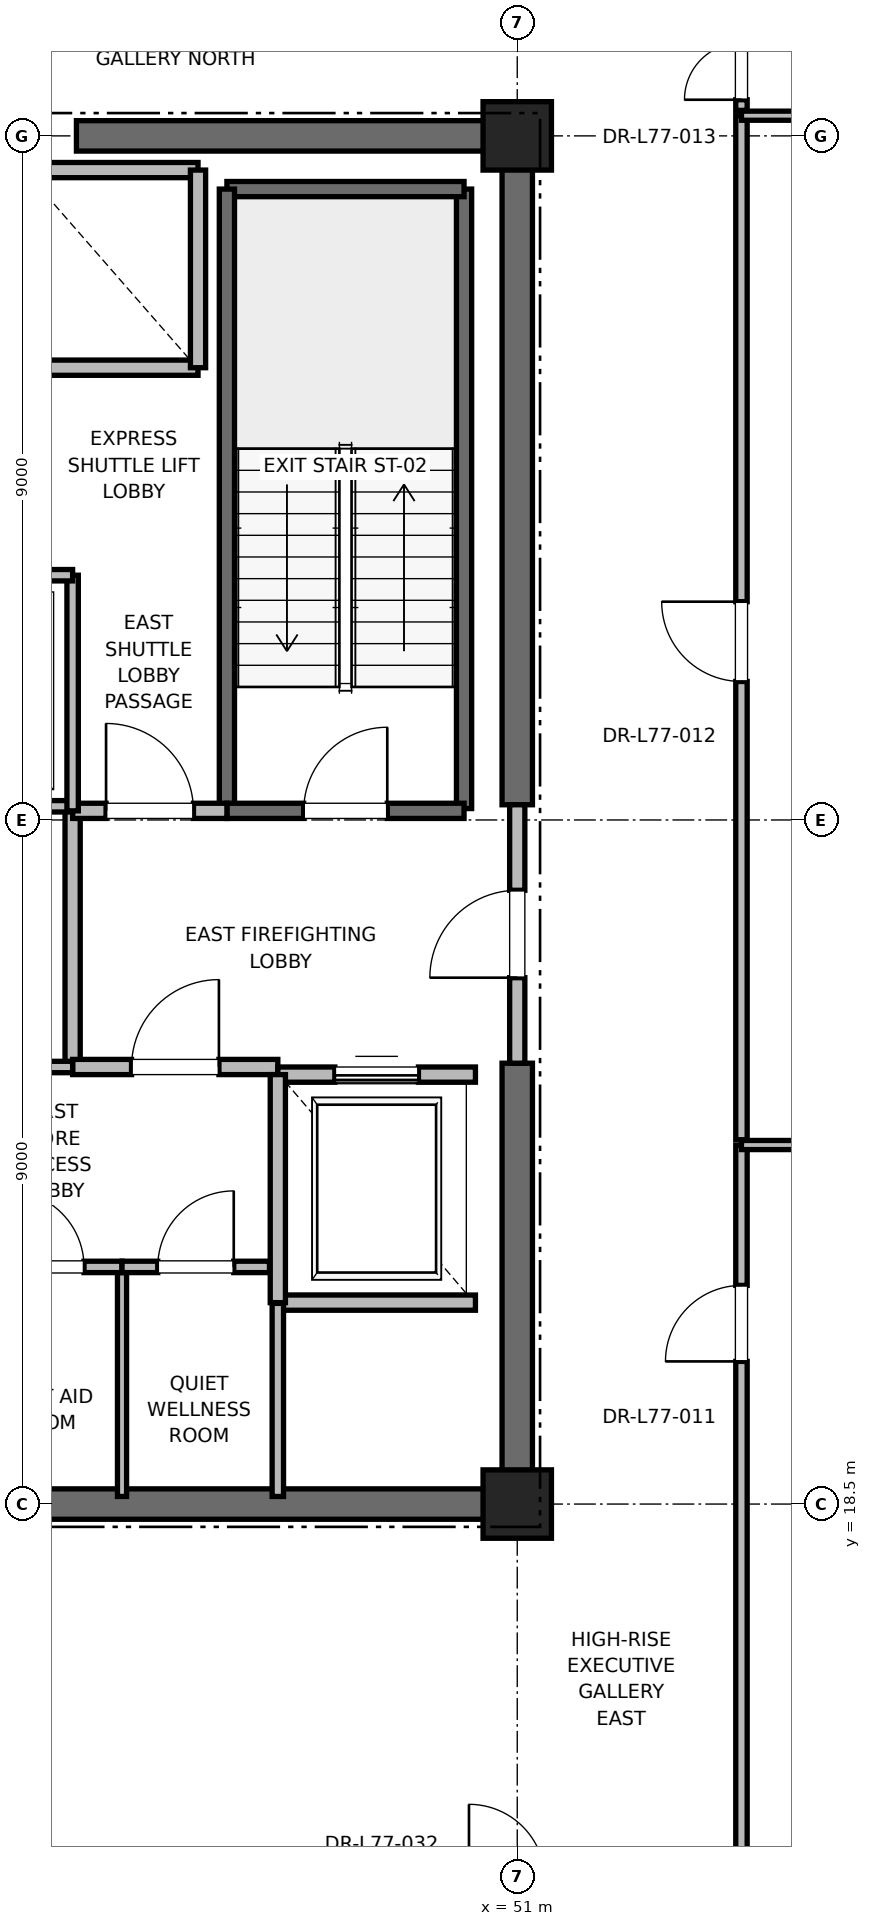
"""IFC4 building model, lengths in metres.
Left out: names, types, materials, properties, quantities, classifications, styles, units other than length and angle.
Written with IfcOpenShell. Run it as: python <this file> out.ifc"""

import sys

from ifc_helpers import new_model, si_unit, direction, frame, frame_2d, origin, origin_2d, place, context, subcontext, project, spatial, rectangle, extrude, element, fill, save


model = new_model("IFC4")
c1 = context("Model", 3, precision=1e-05, world=origin(), true_north=direction((0.0, 1.0)))
c2 = subcontext(c1, "Body", "Model", "MODEL_VIEW")
j1 = project(units=[si_unit("LENGTHUNIT", "METRE"), si_unit("PLANEANGLEUNIT", "RADIAN")], contexts=[c1])
p1 = place(None, origin())
s1 = spatial("IfcSite", under=j1, at=p1, CompositionType="ELEMENT")
p2 = place(p1, origin())
s2 = spatial("IfcBuilding", under=s1, at=p2, CompositionType="ELEMENT")
p3 = place(p2, frame((0.0, 0.0, 330.8)))
s3 = spatial("IfcBuildingStorey", under=s2, at=p3, CompositionType="ELEMENT", Elevation=330.8)
for number, where, z_axis, x_axis in (
    (1, (51.0, 18.5, 0.0), (0.0, 0.0, 1.0), (1.0, 0.0, 0.0)),
    (2, (51.0, 36.5, 0.0), (0.0, 0.0, 1.0), (1.0, 0.0, 0.0)),
):
    element("IfcColumn", number, at=place(p3, frame(where, z_axis=z_axis, x_axis=x_axis)), inside=s3, PredefinedType="PILASTER", context=c2, shape_type="SweptSolid", body=[
        extrude(rectangle(XDim=0.9, YDim=0.9, at=origin_2d()), origin(), (0.0, 0.0, 1.0), 4.0),
    ])
p4 = place(p3, frame((41.8, 18.5, 0.0), z_axis=(0.0, 0.0, 1.0), x_axis=(1.0, 0.0, 0.0)))
e3 = element("IfcWall", 3, at=p4, inside=s3, PredefinedType="SHEAR", context=c2, shape_type="SweptSolid", body=[
    extrude(rectangle(XDim=9.2, YDim=0.4, at=frame_2d((4.6, 0.0))), origin(), (0.0, 0.0, 1.0), 3.785),
])
for number, where, z_axis, x_axis in (
    (4, (45.2, 36.5, 0.0), (0.0, 0.0, 1.0), (1.0, 0.0, 0.0)),
    (5, (51.0, 18.5, 0.0), (0.0, 0.0, 1.0), (0.0, 1.0, 0.0)),
):
    element("IfcWall", number, at=place(p3, frame(where, z_axis=z_axis, x_axis=x_axis)), inside=s3, PredefinedType="SHEAR", context=c2, shape_type="SweptSolid", body=[
        extrude(rectangle(XDim=5.8, YDim=0.4, at=frame_2d((2.9, 0.0))), origin(), (0.0, 0.0, 1.0), 3.785),
    ])
p5 = place(p3, frame((51.0, 27.7, 0.0), z_axis=(0.0, 0.0, 1.0), x_axis=(0.0, 1.0, 0.0)))
e6 = element("IfcWall", 6, at=p5, inside=s3, PredefinedType="SHEAR", context=c2, shape_type="SweptSolid", body=[
    extrude(rectangle(XDim=8.8, YDim=0.4, at=frame_2d((4.4, 0.0))), origin(), (0.0, 0.0, 1.0), 3.785),
])
p6 = place(p3, frame((50.3, 27.65, 0.0), z_axis=(0.0, 0.0, 1.0), x_axis=(0.0, 1.0, 0.0)))
e7 = element("IfcWall", 7, at=p6, inside=s3, PredefinedType="SOLIDWALL", context=c2, shape_type="SweptSolid", body=[
    extrude(rectangle(XDim=8.15, YDim=0.2, at=frame_2d((4.075, 0.0))), origin(), (0.0, 0.0, 1.0), 3.785),
])
p7 = place(p3, frame((47.18, 35.8, 0.0), z_axis=(0.0, 0.0, 1.0), x_axis=(1.0, 0.0, 0.0)))
e8 = element("IfcWall", 8, at=p7, inside=s3, PredefinedType="SOLIDWALL", context=c2, shape_type="SweptSolid", body=[
    extrude(rectangle(XDim=3.12, YDim=0.2, at=frame_2d((1.56, 0.0))), origin(), (0.0, 0.0, 1.0), 3.785),
])
p8 = place(p3, frame((47.18, 27.62, 0.0), z_axis=(0.0, 0.0, 1.0), x_axis=(0.0, 1.0, 0.0)))
e9 = element("IfcWall", 9, at=p8, inside=s3, PredefinedType="SOLIDWALL", context=c2, shape_type="SweptSolid", body=[
    extrude(rectangle(XDim=8.18, YDim=0.2, at=frame_2d((4.09, 0.0))), origin(), (0.0, 0.0, 1.0), 3.785),
])
p9 = place(p3, frame((47.18, 27.62, 0.0), z_axis=(0.0, 0.0, 1.0), x_axis=(1.0, 0.0, 0.0)))
e10 = element("IfcWall", 10, at=p9, inside=s3, PredefinedType="SOLIDWALL", context=c2, shape_type="SweptSolid", body=[
    extrude(rectangle(XDim=3.12, YDim=0.2, at=frame_2d((1.56, 0.0))), origin(), (0.0, 0.0, 1.0), 3.785),
])
p10 = place(p9, frame((1.01, 0.0, 0.0)))
e11 = element("IfcOpeningElement", 11, at=p10, cuts=e10, PredefinedType="OPENING", context=c2, shape_type="SweptSolid", body=[
    extrude(rectangle(XDim=1.1, YDim=2.15, at=frame_2d((0.55, 1.075))), frame((0.0, 0.1, 0.0), z_axis=(0.0, -1.0, 0.0), x_axis=(1.0, 0.0, 0.0)), (0.0, 0.0, 1.0), 0.2),
])
p11 = place(p3, frame((45.15, 24.25, 0.0), z_axis=(0.0, 0.0, 1.0), x_axis=(0.0, 1.0, 0.0)))
e12 = element("IfcWall", 12, at=p11, inside=s3, PredefinedType="PARTITIONING", context=c2, shape_type="SweptSolid", body=[
    extrude(rectangle(XDim=3.37, YDim=0.2, at=frame_2d((1.685, 0.0))), origin(), (0.0, 0.0, 1.0), 3.785),
])
p12 = place(p3, frame((45.15, 24.25, 0.0), z_axis=(0.0, 0.0, 1.0), x_axis=(1.0, 0.0, 0.0)))
e13 = element("IfcWall", 13, at=p12, inside=s3, PredefinedType="PARTITIONING", context=c2, shape_type="SweptSolid", body=[
    extrude(rectangle(XDim=2.7, YDim=0.2, at=frame_2d((1.35, 0.0))), origin(), (0.0, 0.0, 1.0), 3.785),
])
p13 = place(p12, frame((0.775, 0.0, 0.0)))
e14 = element("IfcOpeningElement", 14, at=p13, cuts=e13, PredefinedType="OPENING", context=c2, shape_type="SweptSolid", body=[
    extrude(rectangle(XDim=1.15, YDim=2.2, at=frame_2d((0.575, 1.1))), frame((0.0, 0.1, 0.0), z_axis=(0.0, -1.0, 0.0), x_axis=(1.0, 0.0, 0.0)), (0.0, 0.0, 1.0), 0.2),
])
p14 = place(p3, frame((45.15, 27.62, 0.0), z_axis=(0.0, 0.0, 1.0), x_axis=(1.0, 0.0, 0.0)))
e15 = element("IfcWall", 15, at=p14, inside=s3, PredefinedType="PARTITIONING", context=c2, shape_type="SweptSolid", body=[
    extrude(rectangle(XDim=2.03, YDim=0.2, at=frame_2d((1.015, 0.0))), origin(), (0.0, 0.0, 1.0), 3.785),
])
p15 = place(p14, frame((0.44, 0.0, 0.0)))
e16 = element("IfcOpeningElement", 16, at=p15, cuts=e15, PredefinedType="OPENING", context=c2, shape_type="SweptSolid", body=[
    extrude(rectangle(XDim=1.15, YDim=2.2, at=frame_2d((0.575, 1.1))), frame((0.0, 0.1, 0.0), z_axis=(0.0, -1.0, 0.0), x_axis=(1.0, 0.0, 0.0)), (0.0, 0.0, 1.0), 0.2),
])
p16 = place(p3, frame((51.0, 24.3, 0.0), z_axis=(0.0, 0.0, 1.0), x_axis=(0.0, 1.0, 0.0)))
e17 = element("IfcWall", 17, at=p16, inside=s3, PredefinedType="PARTITIONING", context=c2, shape_type="SweptSolid", body=[
    extrude(rectangle(XDim=3.4, YDim=0.2, at=frame_2d((1.7, 0.0))), origin(), (0.0, 0.0, 1.0), 2.865),
])
p17 = place(p16, frame((1.125, 0.0, 0.0)))
e18 = element("IfcOpeningElement", 18, at=p17, cuts=e17, PredefinedType="OPENING", context=c2, shape_type="SweptSolid", body=[
    extrude(rectangle(XDim=1.15, YDim=2.2, at=frame_2d((0.575, 1.1))), frame((0.0, 0.1, 0.0), z_axis=(0.0, -1.0, 0.0), x_axis=(1.0, 0.0, 0.0)), (0.0, 0.0, 1.0), 0.2),
])
p18 = place(p3, frame((47.85, 21.15, 0.0), z_axis=(0.0, 0.0, 1.0), x_axis=(1.0, 0.0, 0.0)))
e19 = element("IfcWall", 19, at=p18, inside=s3, PredefinedType="SOLIDWALL", context=c2, shape_type="SweptSolid", body=[
    extrude(rectangle(XDim=2.6, YDim=0.2, at=frame_2d((1.3, 0.0))), origin(), (0.0, 0.0, 1.0), 3.785),
])
p19 = place(p3, frame((50.45, 24.15, 0.0), z_axis=(0.0, 0.0, 1.0), x_axis=(-1.0, 0.0, 0.0)))
e20 = element("IfcWall", 20, at=p19, inside=s3, PredefinedType="SOLIDWALL", context=c2, shape_type="SweptSolid", body=[
    extrude(rectangle(XDim=2.6, YDim=0.2, at=frame_2d((1.3, 0.0))), origin(), (0.0, 0.0, 1.0), 2.865),
])
p20 = place(p19, frame((0.75, 0.0, 0.0)))
e21 = element("IfcOpeningElement", 21, at=p20, cuts=e20, PredefinedType="OPENING", context=c2, shape_type="SweptSolid", body=[
    extrude(rectangle(XDim=1.1, YDim=2.2, at=frame_2d((0.55, 1.1))), frame((0.0, 0.1, 0.0), z_axis=(0.0, -1.0, 0.0), x_axis=(1.0, 0.0, 0.0)), (0.0, 0.0, 1.0), 0.2),
])
p21 = place(p3, frame((47.85, 24.15, 0.0), z_axis=(0.0, 0.0, 1.0), x_axis=(0.0, -1.0, 0.0)))
e22 = element("IfcWall", 22, at=p21, inside=s3, PredefinedType="SOLIDWALL", context=c2, shape_type="SweptSolid", body=[
    extrude(rectangle(XDim=3.0, YDim=0.2, at=frame_2d((1.5, 0.0))), origin(), (0.0, 0.0, 1.0), 3.785),
])
p22 = place(p3, frame((44.5, 33.45, 0.0), z_axis=(0.0, 0.0, 1.0), x_axis=(1.0, 0.0, 0.0)))
e23 = element("IfcWall", 23, at=p22, inside=s3, PredefinedType="SOLIDWALL", context=c2, shape_type="SweptSolid", body=[
    extrude(rectangle(XDim=2.3, YDim=0.2, at=frame_2d((1.15, 0.0))), origin(), (0.0, 0.0, 1.0), 3.785),
])
p23 = place(p3, frame((46.8, 36.05, 0.0), z_axis=(0.0, 0.0, 1.0), x_axis=(-1.0, 0.0, 0.0)))
e24 = element("IfcWall", 24, at=p23, inside=s3, PredefinedType="SOLIDWALL", context=c2, shape_type="SweptSolid", body=[
    extrude(rectangle(XDim=2.3, YDim=0.2, at=frame_2d((1.15, 0.0))), origin(), (0.0, 0.0, 1.0), 2.865),
])
p24 = place(p3, frame((46.8, 33.45, 0.0), z_axis=(0.0, 0.0, 1.0), x_axis=(0.0, 1.0, 0.0)))
e25 = element("IfcWall", 25, at=p24, inside=s3, PredefinedType="SOLIDWALL", context=c2, shape_type="SweptSolid", body=[
    extrude(rectangle(XDim=2.6, YDim=0.2, at=frame_2d((1.3, 0.0))), origin(), (0.0, 0.0, 1.0), 3.785),
])
p25 = place(p3, frame((41.56, 27.68, 0.0), z_axis=(0.0, 0.0, 1.0), x_axis=(1.0, 0.0, 0.0)))
e26 = element("IfcWall", 26, at=p25, inside=s3, PredefinedType="PARTITIONING", context=c2, shape_type="SweptSolid", body=[
    extrude(rectangle(XDim=3.59, YDim=0.15, at=frame_2d((1.795, 0.0))), origin(), (0.0, 0.0, 1.0), 2.85),
])
p26 = place(p3, frame((47.85, 18.6, 0.0), z_axis=(0.0, 0.0, 1.0), x_axis=(0.0, 1.0, 0.0)))
e27 = element("IfcWall", 27, at=p26, inside=s3, PredefinedType="PARTITIONING", context=c2, shape_type="SweptSolid", body=[
    extrude(rectangle(XDim=2.54, YDim=0.15, at=frame_2d((1.27, 0.0))), origin(), (0.0, 0.0, 1.0), 2.85),
])
p27 = place(p3, frame((45.8, 18.6, 0.0), z_axis=(0.0, 0.0, 1.0), x_axis=(0.0, 1.0, 0.0)))
e28 = element("IfcWall", 28, at=p27, inside=s3, PredefinedType="PARTITIONING", context=c2, shape_type="SweptSolid", body=[
    extrude(rectangle(XDim=3.02, YDim=0.12, at=frame_2d((1.51, 0.0))), origin(), (0.0, 0.0, 1.0), 2.85),
])
p28 = place(p3, frame((43.8, 21.62, 0.0), z_axis=(0.0, 0.0, 1.0), x_axis=(1.0, 0.0, 0.0)))
e29 = element("IfcWall", 29, at=p28, inside=s3, PredefinedType="PARTITIONING", context=c2, shape_type="SweptSolid", body=[
    extrude(rectangle(XDim=2.0, YDim=0.15, at=frame_2d((1.0, 0.0))), origin(), (0.0, 0.0, 1.0), 2.85),
])
p29 = place(p28, frame((0.5, 0.0, 0.0)))
e30 = element("IfcOpeningElement", 30, at=p29, cuts=e29, PredefinedType="OPENING", context=c2, shape_type="SweptSolid", body=[
    extrude(rectangle(XDim=1.0, YDim=2.15, at=frame_2d((0.5, 1.075))), frame((0.0, 0.075, 0.0), z_axis=(0.0, -1.0, 0.0), x_axis=(1.0, 0.0, 0.0)), (0.0, 0.0, 1.0), 0.15),
])
p30 = place(p3, frame((45.8, 21.62, 0.0), z_axis=(0.0, 0.0, 1.0), x_axis=(1.0, 0.0, 0.0)))
e31 = element("IfcWall", 31, at=p30, inside=s3, PredefinedType="PARTITIONING", context=c2, shape_type="SweptSolid", body=[
    extrude(rectangle(XDim=1.94, YDim=0.15, at=frame_2d((0.97, 0.0))), origin(), (0.0, 0.0, 1.0), 2.85),
])
p31 = place(p30, frame((0.47, 0.0, 0.0)))
e32 = element("IfcOpeningElement", 32, at=p31, cuts=e31, PredefinedType="OPENING", context=c2, shape_type="SweptSolid", body=[
    extrude(rectangle(XDim=1.0, YDim=2.15, at=frame_2d((0.5, 1.075))), frame((0.0, 0.075, 0.0), z_axis=(0.0, -1.0, 0.0), x_axis=(1.0, 0.0, 0.0)), (0.0, 0.0, 1.0), 0.15),
])
p32 = place(p3, frame((41.76, 24.25, 0.0), z_axis=(0.0, 0.0, 1.0), x_axis=(1.0, 0.0, 0.0)))
e33 = element("IfcWall", 33, at=p32, inside=s3, PredefinedType="PARTITIONING", context=c2, shape_type="SweptSolid", body=[
    extrude(rectangle(XDim=3.39, YDim=0.15, at=frame_2d((1.695, 0.0))), origin(), (0.0, 0.0, 1.0), 2.85),
])
p33 = place(p32, frame((1.255, 0.0, 0.0)))
e34 = element("IfcOpeningElement", 34, at=p33, cuts=e33, PredefinedType="OPENING", context=c2, shape_type="SweptSolid", body=[
    extrude(rectangle(XDim=0.88, YDim=2.1, at=frame_2d((0.44, 1.05))), frame((0.0, 0.075, 0.0), z_axis=(0.0, -1.0, 0.0), x_axis=(1.0, 0.0, 0.0)), (0.0, 0.0, 1.0), 0.15),
])
p34 = place(p3, frame((45.15, 27.62, 0.0), z_axis=(0.0, 0.0, 1.0), x_axis=(0.0, 1.0, 0.0)))
e35 = element("IfcWall", 35, at=p34, inside=s3, PredefinedType="PARTITIONING", context=c2, shape_type="SweptSolid", body=[
    extrude(rectangle(XDim=3.1, YDim=0.15, at=frame_2d((1.55, 0.0))), origin(), (0.0, 0.0, 1.0), 2.85),
])
p35 = place(p3, frame((43.6, 30.72, 0.0), z_axis=(0.0, 0.0, 1.0), x_axis=(1.0, 0.0, 0.0)))
e36 = element("IfcWall", 36, at=p35, inside=s3, PredefinedType="PARTITIONING", context=c2, shape_type="SweptSolid", body=[
    extrude(rectangle(XDim=1.55, YDim=0.15, at=frame_2d((0.775, 0.0))), origin(), (0.0, 0.0, 1.0), 2.85),
])
p36 = place(p35, frame((0.335, 0.0, 0.0)))
e37 = element("IfcOpeningElement", 37, at=p36, cuts=e36, PredefinedType="OPENING", context=c2, shape_type="SweptSolid", body=[
    extrude(rectangle(XDim=0.88, YDim=2.1, at=frame_2d((0.44, 1.05))), frame((0.0, 0.075, 0.0), z_axis=(0.0, -1.0, 0.0), x_axis=(1.0, 0.0, 0.0)), (0.0, 0.0, 1.0), 0.15),
])
p37 = place(p3, frame((53.95, 9.682, 0.0), z_axis=(0.0, 0.0, 1.0), x_axis=(0.0, 1.0, 0.0)))
e38 = element("IfcWall", 38, at=p37, inside=s3, PredefinedType="PARTITIONING", context=c2, shape_type="SweptSolid", body=[
    extrude(rectangle(XDim=13.542, YDim=0.15, at=frame_2d((6.771, 0.0))), origin(), (0.0, 0.0, 1.0), 2.85),
])
p38 = place(p37, frame((10.695, 0.0, 0.0)))
e39 = element("IfcOpeningElement", 39, at=p38, cuts=e38, PredefinedType="OPENING", context=c2, shape_type="SweptSolid", body=[
    extrude(rectangle(XDim=1.0, YDim=2.15, at=frame_2d((0.5, 1.075))), frame((0.0, 0.075, 0.0), z_axis=(0.0, -1.0, 0.0), x_axis=(1.0, 0.0, 0.0)), (0.0, 0.0, 1.0), 0.15),
])
p39 = place(p3, frame((53.95, 23.224, 0.0), z_axis=(0.0, 0.0, 1.0), x_axis=(1.0, 0.0, 0.0)))
e40 = element("IfcWall", 40, at=p39, inside=s3, PredefinedType="PARTITIONING", context=c2, shape_type="SweptSolid", body=[
    extrude(rectangle(XDim=10.586, YDim=0.12, at=frame_2d((5.293, 0.0))), origin(), (0.0, 0.0, 1.0), 2.85),
])
p40 = place(p3, frame((53.95, 23.294, 0.0), z_axis=(0.0, 0.0, 1.0), x_axis=(0.0, 1.0, 0.0)))
e41 = element("IfcWall", 41, at=p40, inside=s3, PredefinedType="PARTITIONING", context=c2, shape_type="SweptSolid", body=[
    extrude(rectangle(XDim=13.472, YDim=0.15, at=frame_2d((6.736, 0.0))), origin(), (0.0, 0.0, 1.0), 2.85),
])
p41 = place(p40, frame((6.028, 0.0, 0.0)))
e42 = element("IfcOpeningElement", 42, at=p41, cuts=e41, PredefinedType="OPENING", context=c2, shape_type="SweptSolid", body=[
    extrude(rectangle(XDim=1.05, YDim=2.2, at=frame_2d((0.525, 1.1))), frame((0.0, 0.075, 0.0), z_axis=(0.0, -1.0, 0.0), x_axis=(1.0, 0.0, 0.0)), (0.0, 0.0, 1.0), 0.15),
])
p42 = place(p3, frame((53.95, 36.765, 0.0), z_axis=(0.0, 0.0, 1.0), x_axis=(1.0, 0.0, 0.0)))
e43 = element("IfcWall", 43, at=p42, inside=s3, PredefinedType="PARTITIONING", context=c2, shape_type="SweptSolid", body=[
    extrude(rectangle(XDim=10.586, YDim=0.12, at=frame_2d((5.293, 0.0))), origin(), (0.0, 0.0, 1.0), 2.85),
])
p43 = place(p3, frame((53.95, 36.835, 0.0), z_axis=(0.0, 0.0, 1.0), x_axis=(0.0, 1.0, 0.0)))
e44 = element("IfcWall", 44, at=p43, inside=s3, PredefinedType="PARTITIONING", context=c2, shape_type="SweptSolid", body=[
    extrude(rectangle(XDim=8.483, YDim=0.15, at=frame_2d((4.241, 0.0))), origin(), (0.0, 0.0, 1.0), 2.85),
])
p44 = place(p43, frame((0.14, 0.0, 0.0)))
e45 = element("IfcOpeningElement", 45, at=p44, cuts=e44, PredefinedType="OPENING", context=c2, shape_type="SweptSolid", body=[
    extrude(rectangle(XDim=1.5, YDim=2.25, at=frame_2d((0.75, 1.125))), frame((0.0, 0.075, 0.0), z_axis=(0.0, -1.0, 0.0), x_axis=(1.0, 0.0, 0.0)), (0.0, 0.0, 1.0), 0.15),
])
p45 = place(p10, origin())
e46 = element("IfcDoor", 46, at=p45, inside=s3, OperationType="SINGLE_SWING_RIGHT", PredefinedType="DOOR", context=c2, shape_type="SweptSolid", body=[
    extrude(rectangle(XDim=1.1, YDim=2.15, at=frame_2d((0.55, 1.075))), frame((0.0, 0.025, 0.0), z_axis=(0.0, -1.0, 0.0), x_axis=(1.0, 0.0, 0.0)), (0.0, 0.0, 1.0), 0.05),
])
fill(e11, e46)
p46 = place(p13, origin())
e47 = element("IfcDoor", 47, at=p46, inside=s3, OperationType="SINGLE_SWING_RIGHT", PredefinedType="DOOR", context=c2, shape_type="SweptSolid", body=[
    extrude(rectangle(XDim=1.15, YDim=2.2, at=frame_2d((0.575, 1.1))), frame((0.0, 0.025, 0.0), z_axis=(0.0, -1.0, 0.0), x_axis=(1.0, 0.0, 0.0)), (0.0, 0.0, 1.0), 0.05),
])
fill(e14, e47)
p47 = place(p15, origin())
e48 = element("IfcDoor", 48, at=p47, inside=s3, OperationType="SINGLE_SWING_LEFT", PredefinedType="DOOR", context=c2, shape_type="SweptSolid", body=[
    extrude(rectangle(XDim=1.15, YDim=2.2, at=frame_2d((0.575, 1.1))), frame((0.0, 0.025, 0.0), z_axis=(0.0, -1.0, 0.0), x_axis=(1.0, 0.0, 0.0)), (0.0, 0.0, 1.0), 0.05),
])
fill(e16, e48)
p48 = place(p17, origin())
e49 = element("IfcDoor", 49, at=p48, inside=s3, OperationType="SINGLE_SWING_LEFT", PredefinedType="DOOR", context=c2, shape_type="SweptSolid", body=[
    extrude(rectangle(XDim=1.15, YDim=2.2, at=frame_2d((0.575, 1.1))), frame((0.0, 0.025, 0.0), z_axis=(0.0, -1.0, 0.0), x_axis=(1.0, 0.0, 0.0)), (0.0, 0.0, 1.0), 0.05),
])
fill(e18, e49)
p49 = place(p20, origin())
e50 = element("IfcDoor", 50, at=p49, inside=s3, OperationType="SLIDING_TO_RIGHT", PredefinedType="DOOR", context=c2, shape_type="SweptSolid", body=[
    extrude(rectangle(XDim=1.1, YDim=2.2, at=frame_2d((0.55, 1.1))), frame((0.0, 0.025, 0.0), z_axis=(0.0, -1.0, 0.0), x_axis=(1.0, 0.0, 0.0)), (0.0, 0.0, 1.0), 0.05),
])
fill(e21, e50)
p50 = place(p29, origin())
e51 = element("IfcDoor", 51, at=p50, inside=s3, OperationType="SINGLE_SWING_LEFT", PredefinedType="DOOR", context=c2, shape_type="SweptSolid", body=[
    extrude(rectangle(XDim=1.0, YDim=2.15, at=frame_2d((0.5, 1.075))), frame((0.0, 0.025, 0.0), z_axis=(0.0, -1.0, 0.0), x_axis=(1.0, 0.0, 0.0)), (0.0, 0.0, 1.0), 0.05),
])
fill(e30, e51)
p51 = place(p31, origin())
e52 = element("IfcDoor", 52, at=p51, inside=s3, OperationType="SINGLE_SWING_RIGHT", PredefinedType="DOOR", context=c2, shape_type="SweptSolid", body=[
    extrude(rectangle(XDim=1.0, YDim=2.15, at=frame_2d((0.5, 1.075))), frame((0.0, 0.025, 0.0), z_axis=(0.0, -1.0, 0.0), x_axis=(1.0, 0.0, 0.0)), (0.0, 0.0, 1.0), 0.05),
])
fill(e32, e52)
p52 = place(p38, origin())
e53 = element("IfcDoor", 53, at=p52, inside=s3, OperationType="SINGLE_SWING_LEFT", PredefinedType="DOOR", context=c2, shape_type="SweptSolid", body=[
    extrude(rectangle(XDim=1.0, YDim=2.15, at=frame_2d((0.5, 1.075))), frame((0.0, 0.025, 0.0), z_axis=(0.0, -1.0, 0.0), x_axis=(1.0, 0.0, 0.0)), (0.0, 0.0, 1.0), 0.05),
])
fill(e39, e53)
p53 = place(p41, origin())
e54 = element("IfcDoor", 54, at=p53, inside=s3, OperationType="SINGLE_SWING_RIGHT", PredefinedType="DOOR", context=c2, shape_type="SweptSolid", body=[
    extrude(rectangle(XDim=1.05, YDim=2.2, at=frame_2d((0.525, 1.1))), frame((0.0, 0.025, 0.0), z_axis=(0.0, -1.0, 0.0), x_axis=(1.0, 0.0, 0.0)), (0.0, 0.0, 1.0), 0.05),
])
fill(e42, e54)
p54 = place(p44, origin())
e55 = element("IfcDoor", 55, at=p54, inside=s3, OperationType="DOUBLE_DOOR_SINGLE_SWING", PredefinedType="DOOR", context=c2, shape_type="SweptSolid", body=[
    extrude(rectangle(XDim=1.5, YDim=2.25, at=frame_2d((0.75, 1.125))), frame((0.0, 0.025, 0.0), z_axis=(0.0, -1.0, 0.0), x_axis=(1.0, 0.0, 0.0)), (0.0, 0.0, 1.0), 0.05),
])
fill(e45, e55)
save(model, sys.argv[1])
